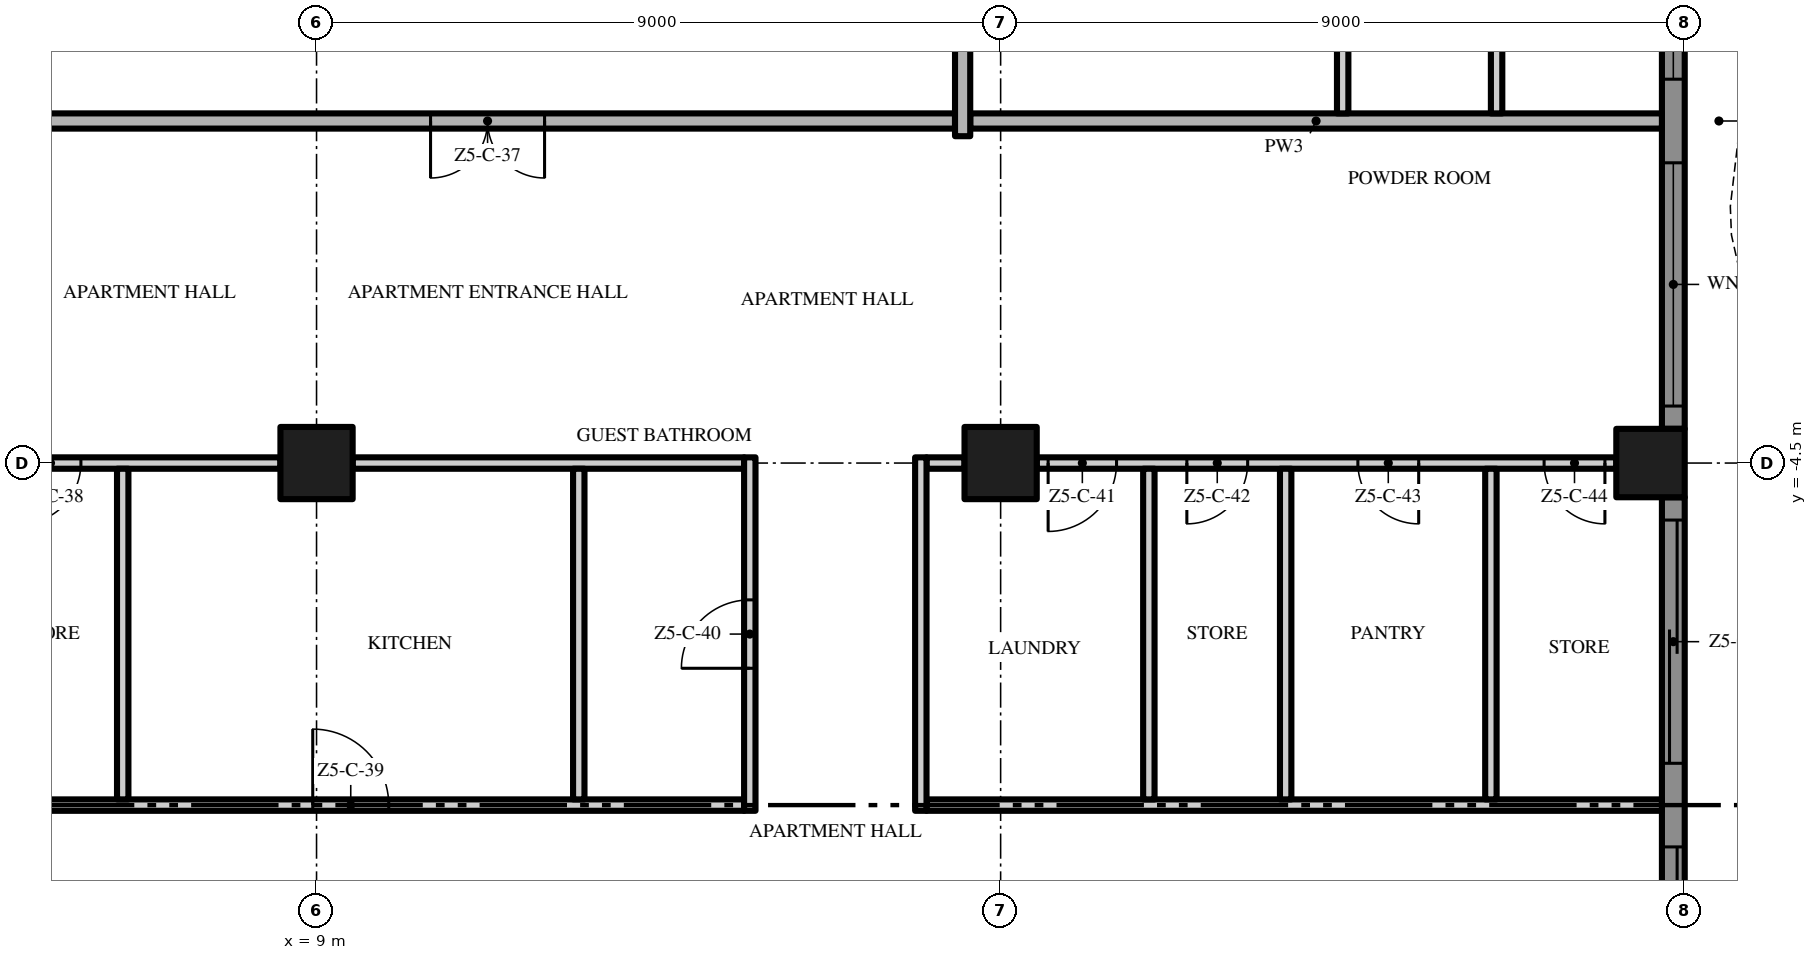
"""IFC4 building model, lengths in metres.
Left out: names, types, materials, properties, quantities, classifications, styles, units other than length and angle.
Written with IfcOpenShell. Run it as: python <this file> out.ifc"""

import sys

from ifc_helpers import new_model, si_unit, direction, frame, frame_2d, origin, origin_2d, place, context, subcontext, project, spatial, polyline, rectangle, outline, extrude, element, fill, save


model = new_model("IFC4")
c1 = context("Model", 3, precision=1e-05, world=origin(), true_north=direction((0.0, 1.0)))
c2 = subcontext(c1, "Body", "Model", "MODEL_VIEW")
j1 = project(units=[si_unit("LENGTHUNIT", "METRE"), si_unit("PLANEANGLEUNIT", "RADIAN")], contexts=[c1])
p1 = place(None, origin())
s1 = spatial("IfcSite", under=j1, at=p1, CompositionType="ELEMENT")
p2 = place(p1, origin())
s2 = spatial("IfcBuilding", under=s1, at=p2, CompositionType="ELEMENT")
p3 = place(p2, frame((0.0, 0.0, 261.6)))
s3 = spatial("IfcBuildingStorey", under=s2, at=p3, CompositionType="ELEMENT", Elevation=261.6)
p4 = place(p3, frame((18.0, -4.5, 0.0), z_axis=(0.0, 0.0, 1.0), x_axis=(1.0, 0.0, 0.0)))
e1 = element("IfcColumn", 1, at=p4, inside=s3, PredefinedType="COLUMN", context=c2, shape_type="SweptSolid", body=[
    extrude(rectangle(XDim=0.95, YDim=0.95, at=origin_2d()), origin(), (0.0, 0.0, 1.0), 3.5),
])
p5 = place(p3, frame((26.55, -4.5, 0.0), z_axis=(0.0, 0.0, 1.0), x_axis=(1.0, 0.0, 0.0)))
e2 = element("IfcColumn", 2, at=p5, inside=s3, PredefinedType="COLUMN", context=c2, shape_type="SweptSolid", body=[
    extrude(rectangle(XDim=0.9, YDim=0.9, at=origin_2d()), origin(), (0.0, 0.0, 1.0), 3.5),
])
p6 = place(p3, frame((9.0, -4.5, 0.0), z_axis=(0.0, 0.0, 1.0), x_axis=(1.0, 0.0, 0.0)))
e3 = element("IfcColumn", 3, at=p6, inside=s3, PredefinedType="COLUMN", context=c2, shape_type="SweptSolid", body=[
    extrude(rectangle(XDim=0.95, YDim=0.95, at=origin_2d()), origin(), (0.0, 0.0, 1.0), 3.5),
])
p7 = place(p3, frame((26.85, -4.95, 0.0), z_axis=(0.0, 0.0, 1.0), x_axis=(0.0, -1.0, 0.0)))
e4 = element("IfcWall", 4, at=p7, inside=s3, PredefinedType="SOLIDWALL", context=c2, shape_type="SweptSolid", body=[
    extrude(rectangle(XDim=8.1, YDim=0.3, at=frame_2d((4.05, 0.0))), origin(), (0.0, 0.0, 1.0), 3.5),
])
p8 = place(p7, frame((4.6, 0.0, 0.0)))
e5 = element("IfcOpeningElement", 5, at=p8, cuts=e4, PredefinedType="OPENING", context=c2, shape_type="SweptSolid", body=[
    extrude(rectangle(XDim=3.2, YDim=2.4, at=frame_2d((1.6, 1.2))), frame((0.0, 0.16, 0.0), z_axis=(0.0, -1.0, 0.0), x_axis=(1.0, 0.0, 0.0)), (0.0, 0.0, 1.0), 0.32),
])
p9 = place(p7, frame((0.3, 0.0, 0.0)))
e6 = element("IfcOpeningElement", 6, at=p9, cuts=e4, PredefinedType="OPENING", context=c2, shape_type="SweptSolid", body=[
    extrude(rectangle(XDim=3.2, YDim=2.4, at=frame_2d((1.6, 1.2))), frame((0.0, 0.16, 0.0), z_axis=(0.0, -1.0, 0.0), x_axis=(1.0, 0.0, 0.0)), (0.0, 0.0, 1.0), 0.32),
])
p10 = place(p3, frame((26.85, 4.05, 0.0), z_axis=(0.0, 0.0, 1.0), x_axis=(0.0, -1.0, 0.0)))
e7 = element("IfcWall", 7, at=p10, inside=s3, PredefinedType="SOLIDWALL", context=c2, shape_type="SweptSolid", body=[
    extrude(rectangle(XDim=8.1, YDim=0.3, at=frame_2d((4.05, 0.0))), origin(), (0.0, 0.0, 1.0), 3.5),
])
p11 = place(p10, frame((4.6, 0.0, 0.45)))
e8 = element("IfcOpeningElement", 8, at=p11, cuts=e7, PredefinedType="OPENING", context=c2, shape_type="SweptSolid", body=[
    extrude(rectangle(XDim=3.2, YDim=2.65, at=frame_2d((1.6, 1.325))), frame((0.0, 0.16, 0.0), z_axis=(0.0, -1.0, 0.0), x_axis=(1.0, 0.0, 0.0)), (0.0, 0.0, 1.0), 0.32),
])
p12 = place(p10, frame((0.3, 0.0, 0.45)))
e9 = element("IfcOpeningElement", 9, at=p12, cuts=e7, PredefinedType="OPENING", context=c2, shape_type="SweptSolid", body=[
    extrude(rectangle(XDim=3.2, YDim=2.65, at=frame_2d((1.6, 1.325))), frame((0.0, 0.16, 0.0), z_axis=(0.0, -1.0, 0.0), x_axis=(1.0, 0.0, 0.0)), (0.0, 0.0, 1.0), 0.32),
])
p13 = place(p3, origin())
e10 = element("IfcWall", 10, at=p13, inside=s3, PredefinedType="USERDEFINED", context=c2, shape_type="SweptSolid", body=[
    extrude(outline(polyline([(27.951, -18.0), (27.615, -16.5), (27.6, -16.125), (27.731, -15.0), (28.255, -13.5), (28.988, -12.0), (29.649, -10.5), (29.985, -9.0), (30.0, -8.625), (29.869, -7.5), (29.345, -6.0), (28.612, -4.5), (27.951, -3.0), (27.615, -1.5), (27.6, -1.125), (27.731, 0.0), (28.255, 1.5), (28.988, 3.0), (29.649, 4.5), (29.985, 6.0), (30.0, 6.375), (29.869, 7.5), (29.345, 9.0), (28.612, 10.5), (27.951, 12.0), (27.615, 13.5), (27.6, 13.875), (27.731, 15.0), (28.255, 16.5), (28.988, 18.0), (28.763, 18.11), (28.024, 16.596), (27.486, 15.056), (27.349, 13.885), (27.366, 13.467), (27.713, 11.921), (28.385, 10.395), (29.114, 8.904), (29.624, 7.444), (29.749, 6.365), (29.736, 6.033), (29.41, 4.579), (28.761, 3.105), (28.024, 1.596), (27.486, 0.056), (27.349, -1.115), (27.366, -1.533), (27.713, -3.079), (28.385, -4.605), (29.114, -6.096), (29.624, -7.556), (29.749, -8.635), (29.736, -8.967), (29.41, -10.421), (28.761, -11.895), (28.024, -13.404), (27.486, -14.944), (27.349, -16.115), (27.366, -16.533), (27.708, -18.055), (27.951, -18.0)])), origin(), (0.0, 0.0, 1.0), 0.9),
])
p14 = place(p3, frame((4.6, -9.0, 0.0), z_axis=(0.0, 0.0, 1.0), x_axis=(1.0, 0.0, 0.0)))
e11 = element("IfcWall", 11, at=p14, inside=s3, PredefinedType="PARTITIONING", context=c2, shape_type="SweptSolid", body=[
    extrude(rectangle(XDim=10.025, YDim=0.15, at=frame_2d((5.013, 0.0))), origin(), (0.0, 0.0, 1.0), 3.5),
])
p15 = place(p14, frame((4.35, 0.0, 0.0)))
e12 = element("IfcOpeningElement", 12, at=p15, cuts=e11, PredefinedType="OPENING", context=c2, shape_type="SweptSolid", body=[
    extrude(rectangle(XDim=1.0, YDim=2.4, at=frame_2d((0.5, 1.2))), frame((0.0, 0.085, 0.0), z_axis=(0.0, -1.0, 0.0), x_axis=(1.0, 0.0, 0.0)), (0.0, 0.0, 1.0), 0.17),
])
p16 = place(p3, frame((17.025, -9.0, 0.0), z_axis=(0.0, 0.0, 1.0), x_axis=(1.0, 0.0, 0.0)))
e13 = element("IfcWall", 13, at=p16, inside=s3, PredefinedType="PARTITIONING", context=c2, shape_type="SweptSolid", body=[
    extrude(rectangle(XDim=9.675, YDim=0.15, at=frame_2d((4.838, 0.0))), origin(), (0.0, 0.0, 1.0), 3.5),
])
p17 = place(p3, frame((8.525, -4.5, 0.0), z_axis=(0.0, 0.0, 1.0), x_axis=(-1.0, 0.0, 0.0)))
e14 = element("IfcWall", 14, at=p17, inside=s3, PredefinedType="PARTITIONING", context=c2, shape_type="SweptSolid", body=[
    extrude(rectangle(XDim=3.925, YDim=0.15, at=frame_2d((1.962, 0.0))), origin(), (0.0, 0.0, 1.0), 3.5),
])
p18 = place(p17, frame((2.625, 0.0, 0.0)))
e15 = element("IfcOpeningElement", 15, at=p18, cuts=e14, PredefinedType="OPENING", context=c2, shape_type="SweptSolid", body=[
    extrude(rectangle(XDim=0.8, YDim=2.0, at=frame_2d((0.4, 1.0))), frame((0.0, 0.085, 0.0), z_axis=(0.0, -1.0, 0.0), x_axis=(1.0, 0.0, 0.0)), (0.0, 0.0, 1.0), 0.17),
])
p19 = place(p3, frame((9.475, -4.5, 0.0), z_axis=(0.0, 0.0, 1.0), x_axis=(1.0, 0.0, 0.0)))
e16 = element("IfcWall", 16, at=p19, inside=s3, PredefinedType="PARTITIONING", context=c2, shape_type="SweptSolid", body=[
    extrude(rectangle(XDim=5.15, YDim=0.15, at=frame_2d((2.575, 0.0))), origin(), (0.0, 0.0, 1.0), 3.5),
])
p20 = place(p3, frame((17.025, -4.5, 0.0), z_axis=(0.0, 0.0, 1.0), x_axis=(1.0, 0.0, 0.0)))
e17 = element("IfcWall", 17, at=p20, inside=s3, PredefinedType="PARTITIONING", context=c2, shape_type="SweptSolid", body=[
    extrude(rectangle(XDim=0.5, YDim=0.15, at=frame_2d((0.25, 0.0))), origin(), (0.0, 0.0, 1.0), 3.5),
])
p21 = place(p3, frame((26.1, -4.5, 0.0), z_axis=(0.0, 0.0, 1.0), x_axis=(-1.0, 0.0, 0.0)))
e18 = element("IfcWall", 18, at=p21, inside=s3, PredefinedType="PARTITIONING", context=c2, shape_type="SweptSolid", body=[
    extrude(rectangle(XDim=7.625, YDim=0.15, at=frame_2d((3.812, 0.0))), origin(), (0.0, 0.0, 1.0), 3.5),
])
p22 = place(p21, frame((6.575, 0.0, 0.0)))
e19 = element("IfcOpeningElement", 19, at=p22, cuts=e18, PredefinedType="OPENING", context=c2, shape_type="SweptSolid", body=[
    extrude(rectangle(XDim=0.9, YDim=2.1, at=frame_2d((0.45, 1.05))), frame((0.0, 0.085, 0.0), z_axis=(0.0, -1.0, 0.0), x_axis=(1.0, 0.0, 0.0)), (0.0, 0.0, 1.0), 0.17),
])
p23 = place(p21, frame((4.85, 0.0, 0.0)))
e20 = element("IfcOpeningElement", 20, at=p23, cuts=e18, PredefinedType="OPENING", context=c2, shape_type="SweptSolid", body=[
    extrude(rectangle(XDim=0.8, YDim=2.0, at=frame_2d((0.4, 1.0))), frame((0.0, 0.085, 0.0), z_axis=(0.0, -1.0, 0.0), x_axis=(1.0, 0.0, 0.0)), (0.0, 0.0, 1.0), 0.17),
])
p24 = place(p21, frame((2.6, 0.0, 0.0)))
e21 = element("IfcOpeningElement", 21, at=p24, cuts=e18, PredefinedType="OPENING", context=c2, shape_type="SweptSolid", body=[
    extrude(rectangle(XDim=0.8, YDim=2.0, at=frame_2d((0.4, 1.0))), frame((0.0, 0.085, 0.0), z_axis=(0.0, -1.0, 0.0), x_axis=(1.0, 0.0, 0.0)), (0.0, 0.0, 1.0), 0.17),
])
p25 = place(p21, frame((0.15, 0.0, 0.0)))
e22 = element("IfcOpeningElement", 22, at=p25, cuts=e18, PredefinedType="OPENING", context=c2, shape_type="SweptSolid", body=[
    extrude(rectangle(XDim=0.8, YDim=2.0, at=frame_2d((0.4, 1.0))), frame((0.0, 0.085, 0.0), z_axis=(0.0, -1.0, 0.0), x_axis=(1.0, 0.0, 0.0)), (0.0, 0.0, 1.0), 0.17),
])
p26 = place(p3, frame((17.4, 0.0, 0.0), z_axis=(0.0, 0.0, 1.0), x_axis=(-1.0, 0.0, 0.0)))
e23 = element("IfcWall", 23, at=p26, inside=s3, PredefinedType="PARTITIONING", context=c2, shape_type="SweptSolid", body=[
    extrude(rectangle(XDim=34.8, YDim=0.2, at=frame_2d((17.4, 0.0))), origin(), (0.0, 0.0, 1.0), 3.5),
])
p27 = place(p26, frame((23.4, 0.0, 0.0)))
e24 = element("IfcOpeningElement", 24, at=p27, cuts=e23, PredefinedType="OPENING", context=c2, shape_type="SweptSolid", body=[
    extrude(rectangle(XDim=1.5, YDim=2.4, at=frame_2d((0.75, 1.2))), frame((0.0, 0.11, 0.0), z_axis=(0.0, -1.0, 0.0), x_axis=(1.0, 0.0, 0.0)), (0.0, 0.0, 1.0), 0.22),
])
p28 = place(p26, frame((5.4, 0.0, 0.0)))
e25 = element("IfcOpeningElement", 25, at=p28, cuts=e23, PredefinedType="OPENING", context=c2, shape_type="SweptSolid", body=[
    extrude(rectangle(XDim=1.5, YDim=2.4, at=frame_2d((0.75, 1.2))), frame((0.0, 0.11, 0.0), z_axis=(0.0, -1.0, 0.0), x_axis=(1.0, 0.0, 0.0)), (0.0, 0.0, 1.0), 0.22),
])
p29 = place(p3, frame((17.6, 0.0, 0.0), z_axis=(0.0, 0.0, 1.0), x_axis=(1.0, 0.0, 0.0)))
e26 = element("IfcWall", 26, at=p29, inside=s3, PredefinedType="PARTITIONING", context=c2, shape_type="SweptSolid", body=[
    extrude(rectangle(XDim=9.1, YDim=0.2, at=frame_2d((4.55, 0.0))), origin(), (0.0, 0.0, 1.0), 3.5),
])
for number, where, z_axis, x_axis in (
    (27, (6.45, -8.925, 0.0), (0.0, 0.0, 1.0), (0.0, 1.0, 0.0)),
    (28, (12.45, -8.925, 0.0), (0.0, 0.0, 1.0), (0.0, 1.0, 0.0)),
):
    element("IfcWall", number, at=place(p3, frame(where, z_axis=z_axis, x_axis=x_axis)), inside=s3, PredefinedType="PARTITIONING", context=c2, shape_type="SweptSolid", body=[
        extrude(rectangle(XDim=4.35, YDim=0.15, at=frame_2d((2.175, 0.0))), origin(), (0.0, 0.0, 1.0), 3.5),
    ])
p30 = place(p3, frame((14.7, -9.075, 0.0), z_axis=(0.0, 0.0, 1.0), x_axis=(0.0, 1.0, 0.0)))
e29 = element("IfcWall", 29, at=p30, inside=s3, PredefinedType="PARTITIONING", context=c2, shape_type="SweptSolid", body=[
    extrude(rectangle(XDim=4.65, YDim=0.15, at=frame_2d((2.325, 0.0))), origin(), (0.0, 0.0, 1.0), 3.5),
])
p31 = place(p30, frame((1.875, 0.0, 0.0)))
e30 = element("IfcOpeningElement", 30, at=p31, cuts=e29, PredefinedType="OPENING", context=c2, shape_type="SweptSolid", body=[
    extrude(rectangle(XDim=0.9, YDim=2.1, at=frame_2d((0.45, 1.05))), frame((0.0, 0.085, 0.0), z_axis=(0.0, -1.0, 0.0), x_axis=(1.0, 0.0, 0.0)), (0.0, 0.0, 1.0), 0.17),
])
p32 = place(p3, frame((16.95, -9.075, 0.0), z_axis=(0.0, 0.0, 1.0), x_axis=(0.0, 1.0, 0.0)))
e31 = element("IfcWall", 31, at=p32, inside=s3, PredefinedType="PARTITIONING", context=c2, shape_type="SweptSolid", body=[
    extrude(rectangle(XDim=4.65, YDim=0.15, at=frame_2d((2.325, 0.0))), origin(), (0.0, 0.0, 1.0), 3.5),
])
p33 = place(p3, frame((17.5, -0.2, 0.0), z_axis=(0.0, 0.0, 1.0), x_axis=(0.0, 1.0, 0.0)))
e32 = element("IfcWall", 32, at=p33, inside=s3, PredefinedType="PARTITIONING", context=c2, shape_type="SweptSolid", body=[
    extrude(rectangle(XDim=4.225, YDim=0.2, at=frame_2d((2.112, 0.0))), origin(), (0.0, 0.0, 1.0), 3.5),
])
for number, where, z_axis, x_axis in (
    (33, (19.95, -8.925, 0.0), (0.0, 0.0, 1.0), (0.0, 1.0, 0.0)),
    (34, (21.75, -8.925, 0.0), (0.0, 0.0, 1.0), (0.0, 1.0, 0.0)),
):
    element("IfcWall", number, at=place(p3, frame(where, z_axis=z_axis, x_axis=x_axis)), inside=s3, PredefinedType="PARTITIONING", context=c2, shape_type="SweptSolid", body=[
        extrude(rectangle(XDim=4.35, YDim=0.15, at=frame_2d((2.175, 0.0))), origin(), (0.0, 0.0, 1.0), 3.5),
    ])
p34 = place(p3, frame((22.5, 17.55, 0.0), z_axis=(0.0, 0.0, 1.0), x_axis=(0.0, -1.0, 0.0)))
e35 = element("IfcWall", 35, at=p34, inside=s3, PredefinedType="PARTITIONING", context=c2, shape_type="SweptSolid", body=[
    extrude(rectangle(XDim=17.45, YDim=0.15, at=frame_2d((8.725, 0.0))), origin(), (0.0, 0.0, 1.0), 3.5),
])
p35 = place(p34, frame((13.25, 0.0, 0.0)))
e36 = element("IfcOpeningElement", 36, at=p35, cuts=e35, PredefinedType="OPENING", context=c2, shape_type="SweptSolid", body=[
    extrude(rectangle(XDim=1.8, YDim=2.4, at=frame_2d((0.9, 1.2))), frame((0.0, 0.085, 0.0), z_axis=(0.0, -1.0, 0.0), x_axis=(1.0, 0.0, 0.0)), (0.0, 0.0, 1.0), 0.17),
])
p36 = place(p34, frame((5.8, 0.0, 0.0)))
e37 = element("IfcOpeningElement", 37, at=p36, cuts=e35, PredefinedType="OPENING", context=c2, shape_type="SweptSolid", body=[
    extrude(rectangle(XDim=1.0, YDim=2.4, at=frame_2d((0.5, 1.2))), frame((0.0, 0.085, 0.0), z_axis=(0.0, -1.0, 0.0), x_axis=(1.0, 0.0, 0.0)), (0.0, 0.0, 1.0), 0.17),
])
p37 = place(p3, frame((24.45, -8.925, 0.0), z_axis=(0.0, 0.0, 1.0), x_axis=(0.0, 1.0, 0.0)))
e38 = element("IfcWall", 38, at=p37, inside=s3, PredefinedType="PARTITIONING", context=c2, shape_type="SweptSolid", body=[
    extrude(rectangle(XDim=4.35, YDim=0.15, at=frame_2d((2.175, 0.0))), origin(), (0.0, 0.0, 1.0), 3.5),
])
p38 = place(p3, frame((24.525, 0.1, 0.0), z_axis=(0.0, 0.0, 1.0), x_axis=(0.0, 1.0, 0.0)))
e39 = element("IfcWall", 39, at=p38, inside=s3, PredefinedType="PARTITIONING", context=c2, shape_type="SweptSolid", body=[
    extrude(rectangle(XDim=2.225, YDim=0.15, at=frame_2d((1.113, 0.0))), origin(), (0.0, 0.0, 1.0), 3.5),
])
p39 = place(p8, origin())
e40 = element("IfcDoor", 40, at=p39, inside=s3, OperationType="SINGLE_SWING_LEFT", PredefinedType="DOOR", context=c2, shape_type="SweptSolid", body=[
    extrude(rectangle(XDim=3.2, YDim=2.4, at=frame_2d((1.6, 1.2))), frame((0.0, 0.025, 0.0), z_axis=(0.0, -1.0, 0.0), x_axis=(1.0, 0.0, 0.0)), (0.0, 0.0, 1.0), 0.05),
])
fill(e5, e40)
p40 = place(p9, origin())
e41 = element("IfcDoor", 41, at=p40, inside=s3, OperationType="SINGLE_SWING_LEFT", PredefinedType="DOOR", context=c2, shape_type="SweptSolid", body=[
    extrude(rectangle(XDim=3.2, YDim=2.4, at=frame_2d((1.6, 1.2))), frame((0.0, 0.025, 0.0), z_axis=(0.0, -1.0, 0.0), x_axis=(1.0, 0.0, 0.0)), (0.0, 0.0, 1.0), 0.05),
])
fill(e6, e41)
p41 = place(p11, origin())
e42 = element("IfcWindow", 42, at=p41, inside=s3, PartitioningType="SINGLE_PANEL", PredefinedType="WINDOW", context=c2, shape_type="SweptSolid", body=[
    extrude(rectangle(XDim=3.2, YDim=2.65, at=frame_2d((1.6, 1.325))), frame((0.0, 0.03, 0.0), z_axis=(0.0, -1.0, 0.0), x_axis=(1.0, 0.0, 0.0)), (0.0, 0.0, 1.0), 0.06),
])
fill(e8, e42)
p42 = place(p12, origin())
e43 = element("IfcWindow", 43, at=p42, inside=s3, PartitioningType="SINGLE_PANEL", PredefinedType="WINDOW", context=c2, shape_type="SweptSolid", body=[
    extrude(rectangle(XDim=3.2, YDim=2.65, at=frame_2d((1.6, 1.325))), frame((0.0, 0.03, 0.0), z_axis=(0.0, -1.0, 0.0), x_axis=(1.0, 0.0, 0.0)), (0.0, 0.0, 1.0), 0.06),
])
fill(e9, e43)
p43 = place(p28, origin())
e44 = element("IfcDoor", 44, at=p43, inside=s3, OperationType="DOUBLE_DOOR_SINGLE_SWING", PredefinedType="DOOR", context=c2, shape_type="SweptSolid", body=[
    extrude(rectangle(XDim=1.5, YDim=2.4, at=frame_2d((0.75, 1.2))), frame((0.0, 0.025, 0.0), z_axis=(0.0, -1.0, 0.0), x_axis=(1.0, 0.0, 0.0)), (0.0, 0.0, 1.0), 0.05),
])
fill(e25, e44)
p44 = place(p18, origin())
e45 = element("IfcDoor", 45, at=p44, inside=s3, OperationType="SINGLE_SWING_RIGHT", PredefinedType="DOOR", context=c2, shape_type="SweptSolid", body=[
    extrude(rectangle(XDim=0.8, YDim=2.0, at=frame_2d((0.4, 1.0))), frame((0.0, 0.025, 0.0), z_axis=(0.0, -1.0, 0.0), x_axis=(1.0, 0.0, 0.0)), (0.0, 0.0, 1.0), 0.05),
])
fill(e15, e45)
p45 = place(p15, origin())
e46 = element("IfcDoor", 46, at=p45, inside=s3, OperationType="SINGLE_SWING_LEFT", PredefinedType="DOOR", context=c2, shape_type="SweptSolid", body=[
    extrude(rectangle(XDim=1.0, YDim=2.4, at=frame_2d((0.5, 1.2))), frame((0.0, 0.025, 0.0), z_axis=(0.0, -1.0, 0.0), x_axis=(1.0, 0.0, 0.0)), (0.0, 0.0, 1.0), 0.05),
])
fill(e12, e46)
p46 = place(p31, origin())
e47 = element("IfcDoor", 47, at=p46, inside=s3, OperationType="SINGLE_SWING_LEFT", PredefinedType="DOOR", context=c2, shape_type="SweptSolid", body=[
    extrude(rectangle(XDim=0.9, YDim=2.1, at=frame_2d((0.45, 1.05))), frame((0.0, 0.025, 0.0), z_axis=(0.0, -1.0, 0.0), x_axis=(1.0, 0.0, 0.0)), (0.0, 0.0, 1.0), 0.05),
])
fill(e30, e47)
p47 = place(p22, origin())
e48 = element("IfcDoor", 48, at=p47, inside=s3, OperationType="SINGLE_SWING_RIGHT", PredefinedType="DOOR", context=c2, shape_type="SweptSolid", body=[
    extrude(rectangle(XDim=0.9, YDim=2.1, at=frame_2d((0.45, 1.05))), frame((0.0, 0.025, 0.0), z_axis=(0.0, -1.0, 0.0), x_axis=(1.0, 0.0, 0.0)), (0.0, 0.0, 1.0), 0.05),
])
fill(e19, e48)
p48 = place(p23, origin())
e49 = element("IfcDoor", 49, at=p48, inside=s3, OperationType="SINGLE_SWING_RIGHT", PredefinedType="DOOR", context=c2, shape_type="SweptSolid", body=[
    extrude(rectangle(XDim=0.8, YDim=2.0, at=frame_2d((0.4, 1.0))), frame((0.0, 0.025, 0.0), z_axis=(0.0, -1.0, 0.0), x_axis=(1.0, 0.0, 0.0)), (0.0, 0.0, 1.0), 0.05),
])
fill(e20, e49)
p49 = place(p24, origin())
e50 = element("IfcDoor", 50, at=p49, inside=s3, OperationType="SINGLE_SWING_LEFT", PredefinedType="DOOR", context=c2, shape_type="SweptSolid", body=[
    extrude(rectangle(XDim=0.8, YDim=2.0, at=frame_2d((0.4, 1.0))), frame((0.0, 0.025, 0.0), z_axis=(0.0, -1.0, 0.0), x_axis=(1.0, 0.0, 0.0)), (0.0, 0.0, 1.0), 0.05),
])
fill(e21, e50)
p50 = place(p25, origin())
e51 = element("IfcDoor", 51, at=p50, inside=s3, OperationType="SINGLE_SWING_LEFT", PredefinedType="DOOR", context=c2, shape_type="SweptSolid", body=[
    extrude(rectangle(XDim=0.8, YDim=2.0, at=frame_2d((0.4, 1.0))), frame((0.0, 0.025, 0.0), z_axis=(0.0, -1.0, 0.0), x_axis=(1.0, 0.0, 0.0)), (0.0, 0.0, 1.0), 0.05),
])
fill(e22, e51)
save(model, sys.argv[1])
